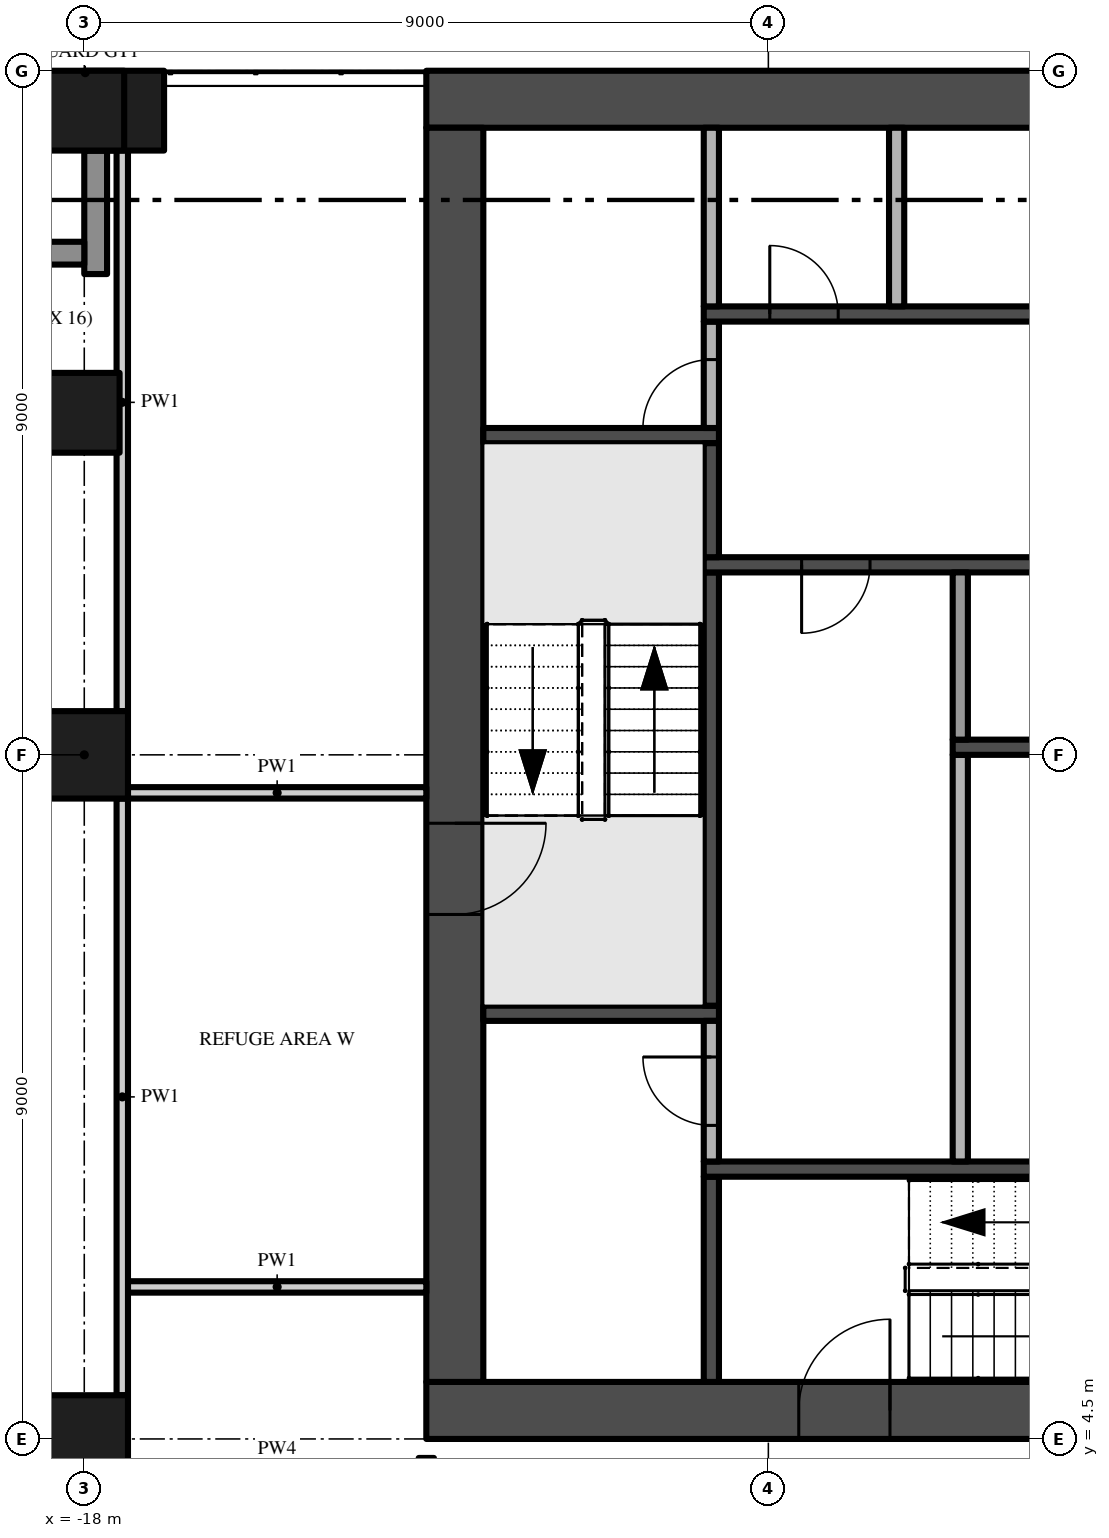
"""IFC4 building model, lengths in metres.
Left out: names, types, materials, properties, quantities, classifications, styles, units other than length and angle.
Written with IfcOpenShell. Run it as: python <this file> out.ifc"""

import sys

from ifc_helpers import new_model, si_unit, direction, frame, frame_2d, origin, origin_2d, place, context, subcontext, project, spatial, rectangle, extrude, element, fill, save


model = new_model("IFC4")
c1 = context("Model", 3, precision=1e-05, world=origin(), true_north=direction((0.0, 1.0)))
c2 = subcontext(c1, "Body", "Model", "MODEL_VIEW")
j1 = project(units=[si_unit("LENGTHUNIT", "METRE"), si_unit("PLANEANGLEUNIT", "RADIAN")], contexts=[c1])
p1 = place(None, origin())
s1 = spatial("IfcSite", under=j1, at=p1, CompositionType="ELEMENT")
p2 = place(p1, origin())
s2 = spatial("IfcBuilding", under=s1, at=p2, CompositionType="ELEMENT")
p3 = place(p2, frame((0.0, 0.0, 179.4)))
s3 = spatial("IfcBuildingStorey", under=s2, at=p3, CompositionType="ELEMENT", Elevation=179.4)
p4 = place(p3, frame((-13.5, 4.875, -0.3), z_axis=(0.0, 0.0, 1.0), x_axis=(1.0, 0.0, 0.0)))
e1 = element("IfcWall", 1, at=p4, inside=s3, PredefinedType="SHEAR", context=c2, shape_type="SweptSolid", body=[
    extrude(rectangle(XDim=27.0, YDim=0.75, at=frame_2d((13.5, 0.0))), origin(), (0.0, 0.0, 1.0), 5.0),
])
p5 = place(p4, frame((12.0, 0.0, 0.3)))
e2 = element("IfcOpeningElement", 2, at=p5, cuts=e1, PredefinedType="OPENING", context=c2, shape_type="SweptSolid", body=[
    extrude(rectangle(XDim=3.0, YDim=2.4, at=frame_2d((1.5, 1.2))), frame((0.0, 0.385, 0.0), z_axis=(0.0, -1.0, 0.0), x_axis=(1.0, 0.0, 0.0)), (0.0, 0.0, 1.0), 0.77),
])
p6 = place(p4, frame((4.9, 0.0, 0.3)))
e3 = element("IfcOpeningElement", 3, at=p6, cuts=e1, PredefinedType="OPENING", context=c2, shape_type="SweptSolid", body=[
    extrude(rectangle(XDim=1.2, YDim=2.2, at=frame_2d((0.6, 1.1))), frame((0.0, 0.385, 0.0), z_axis=(0.0, -1.0, 0.0), x_axis=(1.0, 0.0, 0.0)), (0.0, 0.0, 1.0), 0.77),
])
p7 = place(p4, frame((20.75, 0.0, 0.3)))
e4 = element("IfcOpeningElement", 4, at=p7, cuts=e1, PredefinedType="OPENING", context=c2, shape_type="SweptSolid", body=[
    extrude(rectangle(XDim=1.5, YDim=2.2, at=frame_2d((0.75, 1.1))), frame((0.0, 0.385, 0.0), z_axis=(0.0, -1.0, 0.0), x_axis=(1.0, 0.0, 0.0)), (0.0, 0.0, 1.0), 0.77),
])
p8 = place(p4, frame((17.4, 0.0, 0.3)))
e5 = element("IfcOpeningElement", 5, at=p8, cuts=e1, PredefinedType="OPENING", context=c2, shape_type="SweptSolid", body=[
    extrude(rectangle(XDim=1.2, YDim=2.2, at=frame_2d((0.6, 1.1))), frame((0.0, 0.385, 0.0), z_axis=(0.0, -1.0, 0.0), x_axis=(1.0, 0.0, 0.0)), (0.0, 0.0, 1.0), 0.77),
])
p9 = place(p3, frame((13.5, 22.125, -0.3), z_axis=(0.0, 0.0, 1.0), x_axis=(-1.0, 0.0, 0.0)))
e6 = element("IfcWall", 6, at=p9, inside=s3, PredefinedType="SHEAR", context=c2, shape_type="SweptSolid", body=[
    extrude(rectangle(XDim=27.0, YDim=0.75, at=frame_2d((13.5, 0.0))), origin(), (0.0, 0.0, 1.0), 5.0),
])
p10 = place(p3, frame((-13.125, 21.75, -0.3), z_axis=(0.0, 0.0, 1.0), x_axis=(0.0, -1.0, 0.0)))
e7 = element("IfcWall", 7, at=p10, inside=s3, PredefinedType="SHEAR", context=c2, shape_type="SweptSolid", body=[
    extrude(rectangle(XDim=16.5, YDim=0.75, at=frame_2d((8.25, 0.0))), origin(), (0.0, 0.0, 1.0), 5.0),
])
p11 = place(p10, frame((9.15, 0.0, 0.3)))
e8 = element("IfcOpeningElement", 8, at=p11, cuts=e7, PredefinedType="OPENING", context=c2, shape_type="SweptSolid", body=[
    extrude(rectangle(XDim=1.2, YDim=2.2, at=frame_2d((0.6, 1.1))), frame((0.0, 0.385, 0.0), z_axis=(0.0, -1.0, 0.0), x_axis=(1.0, 0.0, 0.0)), (0.0, 0.0, 1.0), 0.77),
])
p12 = place(p3, frame((-18.0, 13.5, 0.0), z_axis=(0.0, 0.0, 1.0), x_axis=(1.0, 0.0, 0.0)))
e9 = element("IfcColumn", 9, at=p12, inside=s3, PredefinedType="COLUMN", context=c2, shape_type="SweptSolid", body=[
    extrude(rectangle(XDim=1.15, YDim=1.15, at=origin_2d()), origin(), (0.0, 0.0, 1.0), 4.7),
])
p13 = place(p3, frame((-17.475, 21.975, 0.0), z_axis=(-0.111011707821, 0.0, 0.993819098592), x_axis=(0.0, -1.0, 0.0)))
e10 = element("IfcColumn", 10, at=p13, inside=s3, PredefinedType="COLUMN", context=c2, shape_type="SweptSolid", body=[
    extrude(rectangle(XDim=1.05, YDim=1.05, at=origin_2d()), origin(), (0.0, 0.0, 1.0), 4.729),
])
p14 = place(p3, frame((-18.0, 4.5, 0.0), z_axis=(0.0, 0.0, 1.0), x_axis=(1.0, 0.0, 0.0)))
e11 = element("IfcColumn", 11, at=p14, inside=s3, PredefinedType="COLUMN", context=c2, shape_type="SweptSolid", body=[
    extrude(rectangle(XDim=1.15, YDim=1.15, at=origin_2d()), origin(), (0.0, 0.0, 1.0), 4.7),
])
p15 = place(p3, frame((-18.06, 18.0, 0.063), z_axis=(-0.691571492114, 0.0, 0.722308016912), x_axis=(0.0, -1.0, 0.0)))
e12 = element("IfcColumn", 12, at=p15, inside=s3, PredefinedType="COLUMN", context=c2, shape_type="SweptSolid", body=[
    extrude(rectangle(XDim=1.05, YDim=1.05, at=origin_2d()), origin(), (0.0, 0.0, 1.0), 6.332),
])
p16 = place(p3, frame((-17.85, 19.825, 0.0), z_axis=(0.0, 0.0, 1.0), x_axis=(0.0, 1.0, 0.0)))
e13 = element("IfcWall", 13, at=p16, inside=s3, PredefinedType="SOLIDWALL", context=c2, shape_type="SweptSolid", body=[
    extrude(rectangle(XDim=1.625, YDim=0.3, at=frame_2d((0.812, 0.0))), origin(), (0.0, 0.0, 1.0), 4.7),
])
p17 = place(p3, frame((-20.25, 20.1, 0.0), z_axis=(0.0, 0.0, 1.0), x_axis=(1.0, 0.0, 0.0)))
e14 = element("IfcWall", 14, at=p17, inside=s3, PredefinedType="SOLIDWALL", context=c2, shape_type="SweptSolid", body=[
    extrude(rectangle(XDim=2.25, YDim=0.3, at=frame_2d((1.125, 0.0))), origin(), (0.0, 0.0, 1.0), 4.7),
])
for number, where, z_axis, x_axis in (
    (15, (-12.75, 10.1, 0.0), (0.0, 0.0, 1.0), (1.0, 0.0, 0.0)),
    (16, (-12.75, 17.7, 0.0), (0.0, 0.0, 1.0), (1.0, 0.0, 0.0)),
):
    element("IfcWall", number, at=place(p3, frame(where, z_axis=z_axis, x_axis=x_axis)), inside=s3, PredefinedType="SHEAR", context=c2, shape_type="SweptSolid", body=[
        extrude(rectangle(XDim=3.1, YDim=0.2, at=frame_2d((1.55, 0.0))), origin(), (0.0, 0.0, 1.0), 4.7),
    ])
p18 = place(p3, frame((-9.75, 5.25, 0.0), z_axis=(0.0, 0.0, 1.0), x_axis=(0.0, 1.0, 0.0)))
e17 = element("IfcWall", 17, at=p18, inside=s3, PredefinedType="SHEAR", context=c2, shape_type="SweptSolid", body=[
    extrude(rectangle(XDim=2.7, YDim=0.2, at=frame_2d((1.35, 0.0))), origin(), (0.0, 0.0, 1.0), 4.7),
])
p19 = place(p3, frame((-9.85, 8.05, 0.0), z_axis=(0.0, 0.0, 1.0), x_axis=(1.0, 0.0, 0.0)))
e18 = element("IfcWall", 18, at=p19, inside=s3, PredefinedType="SHEAR", context=c2, shape_type="SweptSolid", body=[
    extrude(rectangle(XDim=8.35, YDim=0.2, at=frame_2d((4.175, 0.0))), origin(), (0.0, 0.0, 1.0), 4.7),
])
p20 = place(p3, frame((-9.75, 8.15, 0.0), z_axis=(0.0, 0.0, 1.0), x_axis=(0.0, 1.0, 0.0)))
e19 = element("IfcWall", 19, at=p20, inside=s3, PredefinedType="PARTITIONING", context=c2, shape_type="SweptSolid", body=[
    extrude(rectangle(XDim=1.85, YDim=0.2, at=frame_2d((0.925, 0.0))), origin(), (0.0, 0.0, 1.0), 4.7),
])
p21 = place(p20, frame((0.475, 0.0, 0.0)))
e20 = element("IfcOpeningElement", 20, at=p21, cuts=e19, PredefinedType="OPENING", context=c2, shape_type="SweptSolid", body=[
    extrude(rectangle(XDim=0.9, YDim=2.1, at=frame_2d((0.45, 1.05))), frame((0.0, 0.11, 0.0), z_axis=(0.0, -1.0, 0.0), x_axis=(1.0, 0.0, 0.0)), (0.0, 0.0, 1.0), 0.22),
])
p22 = place(p3, frame((-9.75, 10.2, 0.0), z_axis=(0.0, 0.0, 1.0), x_axis=(0.0, 1.0, 0.0)))
e21 = element("IfcWall", 21, at=p22, inside=s3, PredefinedType="SHEAR", context=c2, shape_type="SweptSolid", body=[
    extrude(rectangle(XDim=5.7, YDim=0.2, at=frame_2d((2.85, 0.0))), origin(), (0.0, 0.0, 1.0), 4.7),
])
p23 = place(p3, frame((-1.5, 16.0, 0.0), z_axis=(0.0, 0.0, 1.0), x_axis=(-1.0, 0.0, 0.0)))
e22 = element("IfcWall", 22, at=p23, inside=s3, PredefinedType="SHEAR", context=c2, shape_type="SweptSolid", body=[
    extrude(rectangle(XDim=8.35, YDim=0.2, at=frame_2d((4.175, 0.0))), origin(), (0.0, 0.0, 1.0), 4.7),
])
p24 = place(p23, frame((6.162, 0.0, 0.0)))
e23 = element("IfcOpeningElement", 23, at=p24, cuts=e22, PredefinedType="OPENING", context=c2, shape_type="SweptSolid", body=[
    extrude(rectangle(XDim=0.9, YDim=2.1, at=frame_2d((0.45, 1.05))), frame((0.0, 0.11, 0.0), z_axis=(0.0, -1.0, 0.0), x_axis=(1.0, 0.0, 0.0)), (0.0, 0.0, 1.0), 0.22),
])
p25 = place(p3, frame((-9.75, 16.1, 0.0), z_axis=(0.0, 0.0, 1.0), x_axis=(0.0, 1.0, 0.0)))
e24 = element("IfcWall", 24, at=p25, inside=s3, PredefinedType="SHEAR", context=c2, shape_type="SweptSolid", body=[
    extrude(rectangle(XDim=1.5, YDim=0.2, at=frame_2d((0.75, 0.0))), origin(), (0.0, 0.0, 1.0), 4.7),
])
p26 = place(p3, frame((-9.75, 17.8, 0.0), z_axis=(0.0, 0.0, 1.0), x_axis=(0.0, 1.0, 0.0)))
e25 = element("IfcWall", 25, at=p26, inside=s3, PredefinedType="PARTITIONING", context=c2, shape_type="SweptSolid", body=[
    extrude(rectangle(XDim=1.4, YDim=0.2, at=frame_2d((0.7, 0.0))), origin(), (0.0, 0.0, 1.0), 4.7),
])
p27 = place(p26, origin())
e26 = element("IfcOpeningElement", 26, at=p27, cuts=e25, PredefinedType="OPENING", context=c2, shape_type="SweptSolid", body=[
    extrude(rectangle(XDim=0.9, YDim=2.1, at=frame_2d((0.45, 1.05))), frame((0.0, 0.11, 0.0), z_axis=(0.0, -1.0, 0.0), x_axis=(1.0, 0.0, 0.0)), (0.0, 0.0, 1.0), 0.22),
])
p28 = place(p3, frame((-9.85, 19.3, 0.0), z_axis=(0.0, 0.0, 1.0), x_axis=(1.0, 0.0, 0.0)))
e27 = element("IfcWall", 27, at=p28, inside=s3, PredefinedType="SHEAR", context=c2, shape_type="SweptSolid", body=[
    extrude(rectangle(XDim=19.7, YDim=0.2, at=frame_2d((9.85, 0.0))), origin(), (0.0, 0.0, 1.0), 4.7),
])
p29 = place(p28, frame((10.519, 0.0, 0.0)))
e28 = element("IfcOpeningElement", 28, at=p29, cuts=e27, PredefinedType="OPENING", context=c2, shape_type="SweptSolid", body=[
    extrude(rectangle(XDim=1.1, YDim=2.1, at=frame_2d((0.55, 1.05))), frame((0.0, 0.11, 0.0), z_axis=(0.0, -1.0, 0.0), x_axis=(1.0, 0.0, 0.0)), (0.0, 0.0, 1.0), 0.22),
])
p30 = place(p28, frame((12.956, 0.0, 0.0)))
e29 = element("IfcOpeningElement", 29, at=p30, cuts=e27, PredefinedType="OPENING", context=c2, shape_type="SweptSolid", body=[
    extrude(rectangle(XDim=1.1, YDim=2.1, at=frame_2d((0.55, 1.05))), frame((0.0, 0.11, 0.0), z_axis=(0.0, -1.0, 0.0), x_axis=(1.0, 0.0, 0.0)), (0.0, 0.0, 1.0), 0.22),
])
p31 = place(p28, frame((15.394, 0.0, 0.0)))
e30 = element("IfcOpeningElement", 30, at=p31, cuts=e27, PredefinedType="OPENING", context=c2, shape_type="SweptSolid", body=[
    extrude(rectangle(XDim=1.1, YDim=2.1, at=frame_2d((0.55, 1.05))), frame((0.0, 0.11, 0.0), z_axis=(0.0, -1.0, 0.0), x_axis=(1.0, 0.0, 0.0)), (0.0, 0.0, 1.0), 0.22),
])
p32 = place(p28, frame((17.831, 0.0, 0.0)))
e31 = element("IfcOpeningElement", 31, at=p32, cuts=e27, PredefinedType="OPENING", context=c2, shape_type="SweptSolid", body=[
    extrude(rectangle(XDim=1.1, YDim=2.1, at=frame_2d((0.55, 1.05))), frame((0.0, 0.11, 0.0), z_axis=(0.0, -1.0, 0.0), x_axis=(1.0, 0.0, 0.0)), (0.0, 0.0, 1.0), 0.22),
])
p33 = place(p28, frame((0.869, 0.0, 0.0)))
e32 = element("IfcOpeningElement", 32, at=p33, cuts=e27, PredefinedType="OPENING", context=c2, shape_type="SweptSolid", body=[
    extrude(rectangle(XDim=0.9, YDim=2.1, at=frame_2d((0.45, 1.05))), frame((0.0, 0.11, 0.0), z_axis=(0.0, -1.0, 0.0), x_axis=(1.0, 0.0, 0.0)), (0.0, 0.0, 1.0), 0.22),
])
p34 = place(p28, frame((4.525, 0.0, 0.0)))
e33 = element("IfcOpeningElement", 33, at=p34, cuts=e27, PredefinedType="OPENING", context=c2, shape_type="SweptSolid", body=[
    extrude(rectangle(XDim=0.9, YDim=2.1, at=frame_2d((0.45, 1.05))), frame((0.0, 0.11, 0.0), z_axis=(0.0, -1.0, 0.0), x_axis=(1.0, 0.0, 0.0)), (0.0, 0.0, 1.0), 0.22),
])
p35 = place(p28, frame((8.181, 0.0, 0.0)))
e34 = element("IfcOpeningElement", 34, at=p35, cuts=e27, PredefinedType="OPENING", context=c2, shape_type="SweptSolid", body=[
    extrude(rectangle(XDim=0.9, YDim=2.1, at=frame_2d((0.45, 1.05))), frame((0.0, 0.11, 0.0), z_axis=(0.0, -1.0, 0.0), x_axis=(1.0, 0.0, 0.0)), (0.0, 0.0, 1.0), 0.22),
])
for number, where, z_axis, x_axis in (
    (35, (-9.75, 19.4, 0.0), (0.0, 0.0, 1.0), (0.0, 1.0, 0.0)),
    (36, (-7.312, 19.4, 0.0), (0.0, 0.0, 1.0), (0.0, 1.0, 0.0)),
):
    element("IfcWall", number, at=place(p3, frame(where, z_axis=z_axis, x_axis=x_axis)), inside=s3, PredefinedType="PARTITIONING", context=c2, shape_type="SweptSolid", body=[
        extrude(rectangle(XDim=2.35, YDim=0.2, at=frame_2d((1.175, 0.0))), origin(), (0.0, 0.0, 1.0), 4.7),
    ])
p36 = place(p3, frame((-6.475, 8.15, 0.0), z_axis=(0.0, 0.0, 1.0), x_axis=(0.0, 1.0, 0.0)))
e37 = element("IfcWall", 37, at=p36, inside=s3, PredefinedType="PARTITIONING", context=c2, shape_type="SweptSolid", body=[
    extrude(rectangle(XDim=5.35, YDim=0.2, at=frame_2d((2.675, 0.0))), origin(), (0.0, 0.0, 1.0), 4.7),
])
p37 = place(p3, frame((-6.575, 13.6, 0.0), z_axis=(0.0, 0.0, 1.0), x_axis=(1.0, 0.0, 0.0)))
e38 = element("IfcWall", 38, at=p37, inside=s3, PredefinedType="SHEAR", context=c2, shape_type="SweptSolid", body=[
    extrude(rectangle(XDim=5.075, YDim=0.2, at=frame_2d((2.538, 0.0))), origin(), (0.0, 0.0, 1.0), 4.7),
])
p38 = place(p3, frame((-6.475, 13.7, 0.0), z_axis=(0.0, 0.0, 1.0), x_axis=(0.0, 1.0, 0.0)))
e39 = element("IfcWall", 39, at=p38, inside=s3, PredefinedType="PARTITIONING", context=c2, shape_type="SweptSolid", body=[
    extrude(rectangle(XDim=2.2, YDim=0.2, at=frame_2d((1.1, 0.0))), origin(), (0.0, 0.0, 1.0), 4.7),
])
for number, where, z_axis, x_axis in (
    (40, (-17.425, 6.5, 0.0), (0.0, 0.0, 1.0), (1.0, 0.0, 0.0)),
    (41, (-17.425, 13.0, 0.0), (0.0, 0.0, 1.0), (1.0, 0.0, 0.0)),
):
    element("IfcWall", number, at=place(p3, frame(where, z_axis=z_axis, x_axis=x_axis)), inside=s3, PredefinedType="PARTITIONING", context=c2, shape_type="SweptSolid", body=[
        extrude(rectangle(XDim=3.925, YDim=0.15, at=frame_2d((1.962, 0.0))), origin(), (0.0, 0.0, 1.0), 4.7),
    ])
p39 = place(p3, frame((-17.5, 5.075, 0.0), z_axis=(0.0, 0.0, 1.0), x_axis=(0.0, 1.0, 0.0)))
e42 = element("IfcWall", 42, at=p39, inside=s3, PredefinedType="PARTITIONING", context=c2, shape_type="SweptSolid", body=[
    extrude(rectangle(XDim=7.85, YDim=0.15, at=frame_2d((3.925, 0.0))), origin(), (0.0, 0.0, 1.0), 4.7),
])
p40 = place(p3, frame((-17.5, 14.075, 0.0), z_axis=(0.0, 0.0, 1.0), x_axis=(0.0, 1.0, 0.0)))
e43 = element("IfcWall", 43, at=p40, inside=s3, PredefinedType="PARTITIONING", context=c2, shape_type="SweptSolid", body=[
    extrude(rectangle(XDim=8.125, YDim=0.15, at=frame_2d((4.062, 0.0))), origin(), (0.0, 0.0, 1.0), 4.7),
])
p41 = place(p11, frame((1.2, 0.0, 0.0), z_axis=(0.0, 0.0, 1.0), x_axis=(-1.0, 0.0, 0.0)))
e44 = element("IfcDoor", 44, at=p41, inside=s3, OperationType="SINGLE_SWING_RIGHT", PredefinedType="DOOR", context=c2, shape_type="SweptSolid", body=[
    extrude(rectangle(XDim=1.2, YDim=2.2, at=frame_2d((0.6, 1.1))), frame((0.0, 0.025, 0.0), z_axis=(0.0, -1.0, 0.0), x_axis=(1.0, 0.0, 0.0)), (0.0, 0.0, 1.0), 0.05),
])
fill(e8, e44)
p42 = place(p6, frame((1.2, 0.0, 0.0), z_axis=(0.0, 0.0, 1.0), x_axis=(-1.0, 0.0, 0.0)))
e45 = element("IfcDoor", 45, at=p42, inside=s3, OperationType="SINGLE_SWING_LEFT", PredefinedType="DOOR", context=c2, shape_type="SweptSolid", body=[
    extrude(rectangle(XDim=1.2, YDim=2.2, at=frame_2d((0.6, 1.1))), frame((0.0, 0.025, 0.0), z_axis=(0.0, -1.0, 0.0), x_axis=(1.0, 0.0, 0.0)), (0.0, 0.0, 1.0), 0.05),
])
fill(e3, e45)
p43 = place(p24, origin())
e46 = element("IfcDoor", 46, at=p43, inside=s3, OperationType="SINGLE_SWING_RIGHT", PredefinedType="DOOR", context=c2, shape_type="SweptSolid", body=[
    extrude(rectangle(XDim=0.9, YDim=2.1, at=frame_2d((0.45, 1.05))), frame((0.0, 0.025, 0.0), z_axis=(0.0, -1.0, 0.0), x_axis=(1.0, 0.0, 0.0)), (0.0, 0.0, 1.0), 0.05),
])
fill(e23, e46)
p44 = place(p27, origin())
e47 = element("IfcDoor", 47, at=p44, inside=s3, OperationType="SINGLE_SWING_LEFT", PredefinedType="DOOR", context=c2, shape_type="SweptSolid", body=[
    extrude(rectangle(XDim=0.9, YDim=2.1, at=frame_2d((0.45, 1.05))), frame((0.0, 0.025, 0.0), z_axis=(0.0, -1.0, 0.0), x_axis=(1.0, 0.0, 0.0)), (0.0, 0.0, 1.0), 0.05),
])
fill(e26, e47)
p45 = place(p33, origin())
e48 = element("IfcDoor", 48, at=p45, inside=s3, OperationType="SINGLE_SWING_LEFT", PredefinedType="DOOR", context=c2, shape_type="SweptSolid", body=[
    extrude(rectangle(XDim=0.9, YDim=2.1, at=frame_2d((0.45, 1.05))), frame((0.0, 0.025, 0.0), z_axis=(0.0, -1.0, 0.0), x_axis=(1.0, 0.0, 0.0)), (0.0, 0.0, 1.0), 0.05),
])
fill(e32, e48)
p46 = place(p21, origin())
e49 = element("IfcDoor", 49, at=p46, inside=s3, OperationType="SINGLE_SWING_RIGHT", PredefinedType="DOOR", context=c2, shape_type="SweptSolid", body=[
    extrude(rectangle(XDim=0.9, YDim=2.1, at=frame_2d((0.45, 1.05))), frame((0.0, 0.025, 0.0), z_axis=(0.0, -1.0, 0.0), x_axis=(1.0, 0.0, 0.0)), (0.0, 0.0, 1.0), 0.05),
])
fill(e20, e49)
save(model, sys.argv[1])
